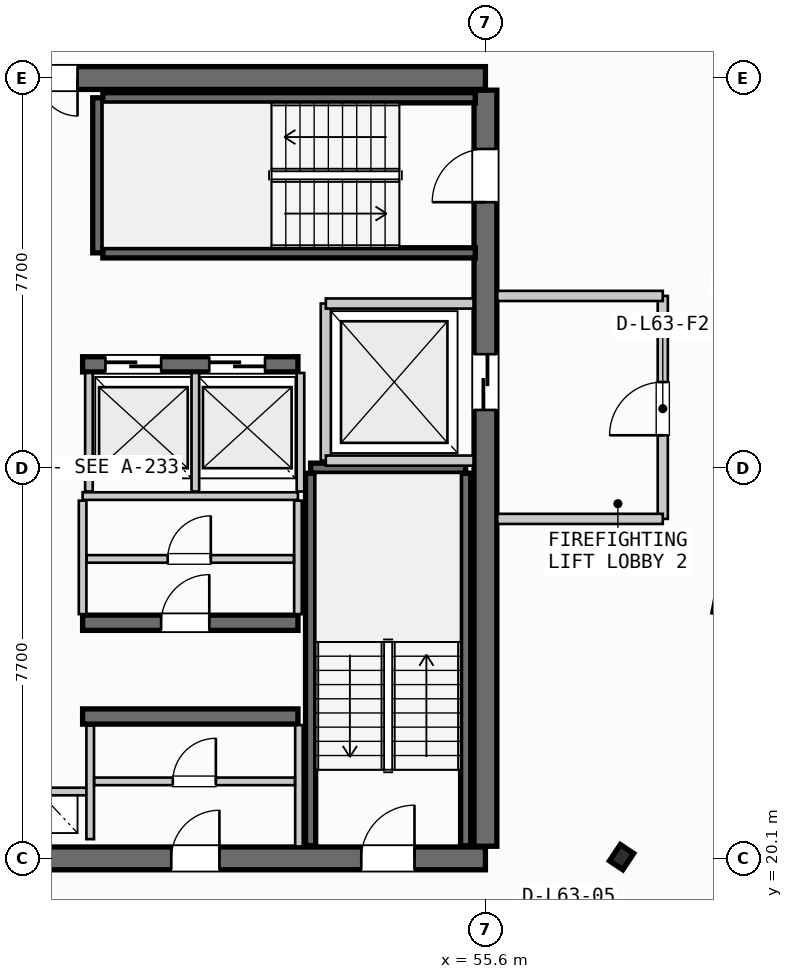
"""IFC4 building model, lengths in metres.
Left out: names, types, materials, properties, quantities, classifications, styles, units other than length and angle.
Written with IfcOpenShell. Run it as: python <this file> out.ifc"""

import sys

from ifc_helpers import new_model, si_unit, direction, frame, frame_2d, origin, origin_2d, place, context, subcontext, project, spatial, rectangle, i_section, extrude, source, transform, mapped, element, fill, save


model = new_model("IFC4")
c1 = context("Model", 3, precision=1e-05, world=origin(), true_north=direction((0.0, 1.0)))
c2 = subcontext(c1, "Body", "Model", "MODEL_VIEW")
j1 = project(units=[si_unit("LENGTHUNIT", "METRE"), si_unit("PLANEANGLEUNIT", "RADIAN")], contexts=[c1])
p1 = place(None, origin())
s1 = spatial("IfcSite", under=j1, at=p1, CompositionType="ELEMENT")
p2 = place(p1, origin())
s2 = spatial("IfcBuilding", under=s1, at=p2, CompositionType="ELEMENT")
p3 = place(p2, frame((0.0, 0.0, 242.2)))
s3 = spatial("IfcBuildingStorey", under=s2, at=p3, CompositionType="ELEMENT", Elevation=242.2)
p4 = place(p3, frame((38.0, 20.1, 0.0), z_axis=(0.0, 0.0, 1.0), x_axis=(1.0, 0.0, 0.0)))
e1 = element("IfcWall", 1, at=p4, inside=s3, PredefinedType="SHEAR", context=c2, shape_type="SweptSolid", body=[
    extrude(rectangle(XDim=17.6, YDim=0.45, at=frame_2d((8.8, 0.0))), origin(), (0.0, 0.0, 1.0), 3.21),
])
p5 = place(p4, frame((1.4, 0.0, 0.0)))
e2 = element("IfcOpeningElement", 2, at=p5, cuts=e1, PredefinedType="OPENING", context=c2, shape_type="SweptSolid", body=[
    extrude(rectangle(XDim=1.05, YDim=2.15, at=frame_2d((0.525, 1.075))), frame((0.0, 0.235, 0.0), z_axis=(0.0, -1.0, 0.0), x_axis=(1.0, 0.0, 0.0)), (0.0, 0.0, 1.0), 0.47),
])
p6 = place(p4, frame((15.15, 0.0, 0.0)))
e3 = element("IfcOpeningElement", 3, at=p6, cuts=e1, PredefinedType="OPENING", context=c2, shape_type="SweptSolid", body=[
    extrude(rectangle(XDim=1.05, YDim=2.15, at=frame_2d((0.525, 1.075))), frame((0.0, 0.235, 0.0), z_axis=(0.0, -1.0, 0.0), x_axis=(1.0, 0.0, 0.0)), (0.0, 0.0, 1.0), 0.47),
])
p7 = place(p4, frame((5.25, 0.0, 0.0)))
e4 = element("IfcOpeningElement", 4, at=p7, cuts=e1, PredefinedType="OPENING", context=c2, shape_type="SweptSolid", body=[
    extrude(rectangle(XDim=0.9, YDim=2.15, at=frame_2d((0.45, 1.075))), frame((0.0, 0.235, 0.0), z_axis=(0.0, -1.0, 0.0), x_axis=(1.0, 0.0, 0.0)), (0.0, 0.0, 1.0), 0.47),
])
p8 = place(p4, frame((11.4, 0.0, 0.0)))
e5 = element("IfcOpeningElement", 5, at=p8, cuts=e1, PredefinedType="OPENING", context=c2, shape_type="SweptSolid", body=[
    extrude(rectangle(XDim=0.95, YDim=2.15, at=frame_2d((0.475, 1.075))), frame((0.0, 0.235, 0.0), z_axis=(0.0, -1.0, 0.0), x_axis=(1.0, 0.0, 0.0)), (0.0, 0.0, 1.0), 0.47),
])
p9 = place(p3, frame((55.6, 35.5, 0.0), z_axis=(0.0, 0.0, 1.0), x_axis=(-1.0, 0.0, 0.0)))
e6 = element("IfcWall", 6, at=p9, inside=s3, PredefinedType="SHEAR", context=c2, shape_type="SweptSolid", body=[
    extrude(rectangle(XDim=17.6, YDim=0.45, at=frame_2d((8.8, 0.0))), origin(), (0.0, 0.0, 1.0), 3.21),
])
p10 = place(p9, frame((8.05, 0.0, 0.0)))
e7 = element("IfcOpeningElement", 7, at=p10, cuts=e6, PredefinedType="OPENING", context=c2, shape_type="SweptSolid", body=[
    extrude(rectangle(XDim=1.5, YDim=2.2, at=frame_2d((0.75, 1.1))), frame((0.0, 0.235, 0.0), z_axis=(0.0, -1.0, 0.0), x_axis=(1.0, 0.0, 0.0)), (0.0, 0.0, 1.0), 0.47),
])
p11 = place(p9, frame((15.1, 0.0, 0.0)))
e8 = element("IfcOpeningElement", 8, at=p11, cuts=e6, PredefinedType="OPENING", context=c2, shape_type="SweptSolid", body=[
    extrude(rectangle(XDim=0.95, YDim=2.15, at=frame_2d((0.475, 1.075))), frame((0.0, 0.235, 0.0), z_axis=(0.0, -1.0, 0.0), x_axis=(1.0, 0.0, 0.0)), (0.0, 0.0, 1.0), 0.47),
])
p12 = place(p9, frame((12.9, 0.0, 0.0)))
e9 = element("IfcOpeningElement", 9, at=p12, cuts=e6, PredefinedType="OPENING", context=c2, shape_type="SweptSolid", body=[
    extrude(rectangle(XDim=0.9, YDim=2.15, at=frame_2d((0.45, 1.075))), frame((0.0, 0.235, 0.0), z_axis=(0.0, -1.0, 0.0), x_axis=(1.0, 0.0, 0.0)), (0.0, 0.0, 1.0), 0.47),
])
p13 = place(p9, frame((10.6, 0.0, 0.0)))
e10 = element("IfcOpeningElement", 10, at=p13, cuts=e6, PredefinedType="OPENING", context=c2, shape_type="SweptSolid", body=[
    extrude(rectangle(XDim=0.95, YDim=2.15, at=frame_2d((0.475, 1.075))), frame((0.0, 0.235, 0.0), z_axis=(0.0, -1.0, 0.0), x_axis=(1.0, 0.0, 0.0)), (0.0, 0.0, 1.0), 0.47),
])
p14 = place(p3, frame((55.6, 20.34, 0.0), z_axis=(0.0, 0.0, 1.0), x_axis=(0.0, 1.0, 0.0)))
e11 = element("IfcWall", 11, at=p14, inside=s3, PredefinedType="SHEAR", context=c2, shape_type="SweptSolid", body=[
    extrude(rectangle(XDim=14.92, YDim=0.45, at=frame_2d((7.46, 0.0))), origin(), (0.0, 0.0, 1.0), 3.21),
])
p15 = place(p14, frame((12.71, 0.0, 0.0)))
e12 = element("IfcOpeningElement", 12, at=p15, cuts=e11, PredefinedType="OPENING", context=c2, shape_type="SweptSolid", body=[
    extrude(rectangle(XDim=1.05, YDim=2.15, at=frame_2d((0.525, 1.075))), frame((0.0, 0.235, 0.0), z_axis=(0.0, -1.0, 0.0), x_axis=(1.0, 0.0, 0.0)), (0.0, 0.0, 1.0), 0.47),
])
p16 = place(p14, frame((8.61, 0.0, 0.0)))
e13 = element("IfcOpeningElement", 13, at=p16, cuts=e11, PredefinedType="OPENING", context=c2, shape_type="SweptSolid", body=[
    extrude(rectangle(XDim=1.1, YDim=2.2, at=frame_2d((0.55, 1.1))), frame((0.0, 0.235, 0.0), z_axis=(0.0, -1.0, 0.0), x_axis=(1.0, 0.0, 0.0)), (0.0, 0.0, 1.0), 0.47),
])
p17 = place(p3, frame((47.65, 22.9, 0.0), z_axis=(0.0, 0.0, 1.0), x_axis=(1.0, 0.0, 0.0)))
e14 = element("IfcWall", 14, at=p17, inside=s3, PredefinedType="SHEAR", context=c2, shape_type="SweptSolid", body=[
    extrude(rectangle(XDim=4.25, YDim=0.3, at=frame_2d((2.125, 0.0))), origin(), (0.0, 0.0, 1.0), 3.21),
])
p18 = place(p3, frame((47.65, 24.75, 0.0), z_axis=(0.0, 0.0, 1.0), x_axis=(1.0, 0.0, 0.0)))
e15 = element("IfcWall", 15, at=p18, inside=s3, PredefinedType="SHEAR", context=c2, shape_type="SweptSolid", body=[
    extrude(rectangle(XDim=4.25, YDim=0.3, at=frame_2d((2.125, 0.0))), origin(), (0.0, 0.0, 1.0), 3.21),
])
p19 = place(p18, frame((1.55, 0.0, 0.0)))
e16 = element("IfcOpeningElement", 16, at=p19, cuts=e15, PredefinedType="OPENING", context=c2, shape_type="SweptSolid", body=[
    extrude(rectangle(XDim=0.95, YDim=2.15, at=frame_2d((0.475, 1.075))), frame((0.0, 0.16, 0.0), z_axis=(0.0, -1.0, 0.0), x_axis=(1.0, 0.0, 0.0)), (0.0, 0.0, 1.0), 0.32),
])
p20 = place(p3, frame((47.65, 29.85, 0.0), z_axis=(0.0, 0.0, 1.0), x_axis=(1.0, 0.0, 0.0)))
e17 = element("IfcWall", 17, at=p20, inside=s3, PredefinedType="SHEAR", context=c2, shape_type="SweptSolid", body=[
    extrude(rectangle(XDim=4.25, YDim=0.3, at=frame_2d((2.125, 0.0))), origin(), (0.0, 0.0, 1.0), 3.21),
])
p21 = place(p20, frame((0.45, 0.0, 0.0)))
e18 = element("IfcOpeningElement", 18, at=p21, cuts=e17, PredefinedType="OPENING", context=c2, shape_type="SweptSolid", body=[
    extrude(rectangle(XDim=1.1, YDim=2.2, at=frame_2d((0.55, 1.1))), frame((0.0, 0.16, 0.0), z_axis=(0.0, -1.0, 0.0), x_axis=(1.0, 0.0, 0.0)), (0.0, 0.0, 1.0), 0.32),
])
p22 = place(p20, frame((2.5, 0.0, 0.0)))
e19 = element("IfcOpeningElement", 19, at=p22, cuts=e17, PredefinedType="OPENING", context=c2, shape_type="SweptSolid", body=[
    extrude(rectangle(XDim=1.1, YDim=2.2, at=frame_2d((0.55, 1.1))), frame((0.0, 0.16, 0.0), z_axis=(0.0, -1.0, 0.0), x_axis=(1.0, 0.0, 0.0)), (0.0, 0.0, 1.0), 0.32),
])
m1 = source(origin(), c2, "Body", "SweptSolid", [
    extrude(i_section(OverallWidth=0.387, OverallDepth=0.316, WebThickness=0.019, FlangeThickness=0.028, FilletRadius=0.015, at=origin_2d()), origin(), (0.0, 0.0, 1.0), 3.21),
])
for number, where, z_axis, x_axis in (
    (20, (58.287, 20.125, 0.0), (0.0, 0.0, 1.0), (0.831, -0.556, 0.0)),
    (21, (60.284, 25.118, 0.0), (0.0, 0.0, 1.0), (0.981, -0.195, 0.0)),
):
    element("IfcColumn", number, at=place(p3, frame(where, z_axis=z_axis, x_axis=x_axis)), inside=s3, PredefinedType="COLUMN", context=c2, shape_type="MappedRepresentation", body=[
        mapped(m1, transform((0.0, 0.0, 0.0), scale=1.0)),
    ])
p23 = place(p3, frame((52.15, 27.8, 0.0), z_axis=(0.0, 0.0, 1.0), x_axis=(1.0, 0.0, 0.0)))
e22 = element("IfcWall", 22, at=p23, inside=s3, PredefinedType="SHEAR", context=c2, shape_type="SweptSolid", body=[
    extrude(rectangle(XDim=3.06, YDim=0.2, at=frame_2d((1.53, 0.0))), origin(), (0.0, 0.0, 1.0), 3.21),
])
for number, where, z_axis, x_axis in (
    (23, (55.21, 27.7, 0.0), (0.0, 0.0, 1.0), (0.0, -1.0, 0.0)),
    (24, (52.15, 20.35, 0.0), (0.0, 0.0, 1.0), (0.0, 1.0, 0.0)),
):
    element("IfcWall", number, at=place(p3, frame(where, z_axis=z_axis, x_axis=x_axis)), inside=s3, PredefinedType="SHEAR", context=c2, shape_type="SweptSolid", body=[
        extrude(rectangle(XDim=7.35, YDim=0.2, at=frame_2d((3.675, 0.0))), origin(), (0.0, 0.0, 1.0), 3.21),
    ])
p24 = place(p3, frame((47.95, 32.05, 0.0), z_axis=(0.0, 0.0, 1.0), x_axis=(0.0, 1.0, 0.0)))
e25 = element("IfcWall", 25, at=p24, inside=s3, PredefinedType="SHEAR", context=c2, shape_type="SweptSolid", body=[
    extrude(rectangle(XDim=3.06, YDim=0.2, at=frame_2d((1.53, 0.0))), origin(), (0.0, 0.0, 1.0), 3.21),
])
for number, where, z_axis, x_axis in (
    (26, (48.05, 35.11, 0.0), (0.0, 0.0, 1.0), (1.0, 0.0, 0.0)),
    (27, (55.4, 32.05, 0.0), (0.0, 0.0, 1.0), (-1.0, 0.0, 0.0)),
):
    element("IfcWall", number, at=place(p3, frame(where, z_axis=z_axis, x_axis=x_axis)), inside=s3, PredefinedType="SHEAR", context=c2, shape_type="SweptSolid", body=[
        extrude(rectangle(XDim=7.35, YDim=0.2, at=frame_2d((3.675, 0.0))), origin(), (0.0, 0.0, 1.0), 3.21),
    ])
p25 = place(p3, frame((45.8, 21.42, 0.0), z_axis=(0.0, 0.0, 1.0), x_axis=(1.0, 0.0, 0.0)))
e28 = element("IfcWall", 28, at=p25, inside=s3, PredefinedType="PARTITIONING", context=c2, shape_type="SweptSolid", body=[
    extrude(rectangle(XDim=2.0, YDim=0.15, at=frame_2d((1.0, 0.0))), origin(), (0.0, 0.0, 1.0), 2.28),
])
p26 = place(p3, frame((47.8, 20.48, 0.0), z_axis=(0.0, 0.0, 1.0), x_axis=(0.0, 1.0, 0.0)))
e29 = element("IfcWall", 29, at=p26, inside=s3, PredefinedType="PARTITIONING", context=c2, shape_type="SweptSolid", body=[
    extrude(rectangle(XDim=2.24, YDim=0.15, at=frame_2d((1.12, 0.0))), origin(), (0.0, 0.0, 1.0), 2.28),
])
p27 = place(p3, frame((52.45, 27.95, 0.0), z_axis=(0.0, 0.0, 1.0), x_axis=(0.0, 1.0, 0.0)))
e30 = element("IfcWall", 30, at=p27, inside=s3, PredefinedType="PARTITIONING", context=c2, shape_type="SweptSolid", body=[
    extrude(rectangle(XDim=3.1, YDim=0.2, at=frame_2d((1.55, 0.0))), origin(), (0.0, 0.0, 1.0), 2.28),
])
for number, where, z_axis, x_axis in (
    (31, (52.45, 27.95, 0.0), (0.0, 0.0, 1.0), (1.0, 0.0, 0.0)),
    (32, (52.45, 31.05, 0.0), (0.0, 0.0, 1.0), (1.0, 0.0, 0.0)),
):
    element("IfcWall", number, at=place(p3, frame(where, z_axis=z_axis, x_axis=x_axis)), inside=s3, PredefinedType="PARTITIONING", context=c2, shape_type="SweptSolid", body=[
        extrude(rectangle(XDim=2.915, YDim=0.2, at=frame_2d((1.458, 0.0))), origin(), (0.0, 0.0, 1.0), 2.28),
    ])
p28 = place(p3, frame((59.1, 26.8, 0.0), z_axis=(0.0, 0.0, 1.0), x_axis=(0.0, 1.0, 0.0)))
e33 = element("IfcWall", 33, at=p28, inside=s3, PredefinedType="PARTITIONING", context=c2, shape_type="SweptSolid", body=[
    extrude(rectangle(XDim=4.4, YDim=0.2, at=frame_2d((2.2, 0.0))), origin(), (0.0, 0.0, 1.0), 2.28),
])
p29 = place(p28, frame((1.65, 0.0, 0.0)))
e34 = element("IfcOpeningElement", 34, at=p29, cuts=e33, PredefinedType="OPENING", context=c2, shape_type="SweptSolid", body=[
    extrude(rectangle(XDim=1.05, YDim=2.15, at=frame_2d((0.525, 1.075))), frame((0.0, 0.11, 0.0), z_axis=(0.0, -1.0, 0.0), x_axis=(1.0, 0.0, 0.0)), (0.0, 0.0, 1.0), 0.22),
])
for number, where, z_axis, x_axis in (
    (35, (55.835, 26.8, 0.0), (0.0, 0.0, 1.0), (1.0, 0.0, 0.0)),
    (36, (55.835, 31.2, 0.0), (0.0, 0.0, 1.0), (1.0, 0.0, 0.0)),
):
    element("IfcWall", number, at=place(p3, frame(where, z_axis=z_axis, x_axis=x_axis)), inside=s3, PredefinedType="PARTITIONING", context=c2, shape_type="SweptSolid", body=[
        extrude(rectangle(XDim=3.265, YDim=0.2, at=frame_2d((1.633, 0.0))), origin(), (0.0, 0.0, 1.0), 2.28),
    ])
p30 = place(p3, frame((51.92, 20.335, 0.0), z_axis=(0.0, 0.0, 1.0), x_axis=(0.0, 1.0, 0.0)))
e37 = element("IfcWall", 37, at=p30, inside=s3, PredefinedType="PARTITIONING", context=c2, shape_type="SweptSolid", body=[
    extrude(rectangle(XDim=2.395, YDim=0.15, at=frame_2d((1.198, 0.0))), origin(), (0.0, 0.0, 1.0), 2.28),
])
p31 = place(p3, frame((47.88, 21.62, 0.0), z_axis=(0.0, 0.0, 1.0), x_axis=(1.0, 0.0, 0.0)))
e38 = element("IfcWall", 38, at=p31, inside=s3, PredefinedType="PARTITIONING", context=c2, shape_type="SweptSolid", body=[
    extrude(rectangle(XDim=3.96, YDim=0.15, at=frame_2d((1.98, 0.0))), origin(), (0.0, 0.0, 1.0), 2.28),
])
p32 = place(p31, frame((1.55, 0.0, 0.0)))
e39 = element("IfcOpeningElement", 39, at=p32, cuts=e38, PredefinedType="OPENING", context=c2, shape_type="SweptSolid", body=[
    extrude(rectangle(XDim=0.85, YDim=2.15, at=frame_2d((0.425, 1.075))), frame((0.0, 0.085, 0.0), z_axis=(0.0, -1.0, 0.0), x_axis=(1.0, 0.0, 0.0)), (0.0, 0.0, 1.0), 0.17),
])
p33 = place(p3, frame((47.65, 27.25, 0.0), z_axis=(0.0, 0.0, 1.0), x_axis=(1.0, 0.0, 0.0)))
e40 = element("IfcWall", 40, at=p33, inside=s3, PredefinedType="PARTITIONING", context=c2, shape_type="SweptSolid", body=[
    extrude(rectangle(XDim=4.25, YDim=0.15, at=frame_2d((2.125, 0.0))), origin(), (0.0, 0.0, 1.0), 2.28),
])
for number, where, z_axis, x_axis in (
    (41, (47.65, 24.92, 0.0), (0.0, 0.0, 1.0), (0.0, 1.0, 0.0)),
    (42, (51.9, 24.92, 0.0), (0.0, 0.0, 1.0), (0.0, 1.0, 0.0)),
):
    element("IfcWall", number, at=place(p3, frame(where, z_axis=z_axis, x_axis=x_axis)), inside=s3, PredefinedType="PARTITIONING", context=c2, shape_type="SweptSolid", body=[
        extrude(rectangle(XDim=2.24, YDim=0.15, at=frame_2d((1.12, 0.0))), origin(), (0.0, 0.0, 1.0), 2.28),
    ])
p34 = place(p3, frame((47.73, 26.01, 0.0), z_axis=(0.0, 0.0, 1.0), x_axis=(1.0, 0.0, 0.0)))
e43 = element("IfcWall", 43, at=p34, inside=s3, PredefinedType="PARTITIONING", context=c2, shape_type="SweptSolid", body=[
    extrude(rectangle(XDim=4.09, YDim=0.15, at=frame_2d((2.045, 0.0))), origin(), (0.0, 0.0, 1.0), 2.28),
])
p35 = place(p34, frame((1.6, 0.0, 0.0)))
e44 = element("IfcOpeningElement", 44, at=p35, cuts=e43, PredefinedType="OPENING", context=c2, shape_type="SweptSolid", body=[
    extrude(rectangle(XDim=0.85, YDim=2.15, at=frame_2d((0.425, 1.075))), frame((0.0, 0.085, 0.0), z_axis=(0.0, -1.0, 0.0), x_axis=(1.0, 0.0, 0.0)), (0.0, 0.0, 1.0), 0.17),
])
for number, where, z_axis, x_axis in (
    (45, (47.775, 27.34, 0.0), (0.0, 0.0, 1.0), (0.0, 1.0, 0.0)),
    (46, (49.875, 27.34, 0.0), (0.0, 0.0, 1.0), (0.0, 1.0, 0.0)),
    (47, (51.95, 27.34, 0.0), (0.0, 0.0, 1.0), (0.0, 1.0, 0.0)),
):
    element("IfcWall", number, at=place(p3, frame(where, z_axis=z_axis, x_axis=x_axis)), inside=s3, PredefinedType="PARTITIONING", context=c2, shape_type="SweptSolid", body=[
        extrude(rectangle(XDim=2.34, YDim=0.15, at=frame_2d((1.17, 0.0))), origin(), (0.0, 0.0, 1.0), 2.28),
    ])
m2 = source(origin(), c2, "Body", "SweptSolid", [
    extrude(rectangle(XDim=1.05, YDim=2.15, at=frame_2d((0.525, 1.075))), frame((0.0, 0.025, 0.0), z_axis=(0.0, -1.0, 0.0), x_axis=(1.0, 0.0, 0.0)), (0.0, 0.0, 1.0), 0.05),
])
p36 = place(p6, origin())
e48 = element("IfcDoor", 48, at=p36, inside=s3, OperationType="SINGLE_SWING_RIGHT", PredefinedType="DOOR", context=c2, shape_type="MappedRepresentation", body=[
    mapped(m2, transform((0.0, 0.0, 0.0), scale=1.0)),
])
fill(e3, e48)
p37 = place(p15, origin())
e49 = element("IfcDoor", 49, at=p37, inside=s3, OperationType="SINGLE_SWING_LEFT", PredefinedType="DOOR", context=c2, shape_type="MappedRepresentation", body=[
    mapped(m2, transform((0.0, 0.0, 0.0), scale=1.0)),
])
fill(e12, e49)
m3 = source(origin(), c2, "Body", "SweptSolid", [
    extrude(rectangle(XDim=1.5, YDim=2.2, at=frame_2d((0.75, 1.1))), frame((0.0, 0.025, 0.0), z_axis=(0.0, -1.0, 0.0), x_axis=(1.0, 0.0, 0.0)), (0.0, 0.0, 1.0), 0.05),
])
p38 = place(p10, origin())
e50 = element("IfcDoor", 50, at=p38, inside=s3, OperationType="DOUBLE_DOOR_SINGLE_SWING", PredefinedType="DOOR", context=c2, shape_type="MappedRepresentation", body=[
    mapped(m3, transform((0.0, 0.0, 0.0), scale=1.0)),
])
fill(e7, e50)
m4 = source(origin(), c2, "Body", "SweptSolid", [
    extrude(rectangle(XDim=1.1, YDim=2.2, at=frame_2d((0.55, 1.1))), frame((0.0, 0.025, 0.0), z_axis=(0.0, -1.0, 0.0), x_axis=(1.0, 0.0, 0.0)), (0.0, 0.0, 1.0), 0.05),
])
p39 = place(p16, origin())
e51 = element("IfcDoor", 51, at=p39, inside=s3, OperationType="SLIDING_TO_RIGHT", PredefinedType="DOOR", context=c2, shape_type="MappedRepresentation", body=[
    mapped(m4, transform((0.0, 0.0, 0.0), scale=1.0)),
])
fill(e13, e51)
m5 = source(origin(), c2, "Body", "SweptSolid", [
    extrude(rectangle(XDim=0.95, YDim=2.15, at=frame_2d((0.475, 1.075))), frame((0.0, 0.025, 0.0), z_axis=(0.0, -1.0, 0.0), x_axis=(1.0, 0.0, 0.0)), (0.0, 0.0, 1.0), 0.05),
])
p40 = place(p8, origin())
e52 = element("IfcDoor", 52, at=p40, inside=s3, OperationType="SINGLE_SWING_RIGHT", PredefinedType="DOOR", context=c2, shape_type="MappedRepresentation", body=[
    mapped(m5, transform((0.0, 0.0, 0.0), scale=1.0)),
])
fill(e5, e52)
p41 = place(p19, origin())
e53 = element("IfcDoor", 53, at=p41, inside=s3, OperationType="SINGLE_SWING_RIGHT", PredefinedType="DOOR", context=c2, shape_type="MappedRepresentation", body=[
    mapped(m5, transform((0.0, 0.0, 0.0), scale=1.0)),
])
fill(e16, e53)
p42 = place(p21, origin())
e54 = element("IfcDoor", 54, at=p42, inside=s3, OperationType="SLIDING_TO_LEFT", PredefinedType="DOOR", context=c2, shape_type="MappedRepresentation", body=[
    mapped(m4, transform((0.0, 0.0, 0.0), scale=1.0)),
])
fill(e18, e54)
p43 = place(p22, origin())
e55 = element("IfcDoor", 55, at=p43, inside=s3, OperationType="SLIDING_TO_LEFT", PredefinedType="DOOR", context=c2, shape_type="MappedRepresentation", body=[
    mapped(m4, transform((0.0, 0.0, 0.0), scale=1.0)),
])
fill(e19, e55)
p44 = place(p29, origin())
e56 = element("IfcDoor", 56, at=p44, inside=s3, OperationType="SINGLE_SWING_LEFT", PredefinedType="DOOR", context=c2, shape_type="MappedRepresentation", body=[
    mapped(m2, transform((0.0, 0.0, 0.0), scale=1.0)),
])
fill(e34, e56)
m6 = source(origin(), c2, "Body", "SweptSolid", [
    extrude(rectangle(XDim=0.85, YDim=2.15, at=frame_2d((0.425, 1.075))), frame((0.0, 0.025, 0.0), z_axis=(0.0, -1.0, 0.0), x_axis=(1.0, 0.0, 0.0)), (0.0, 0.0, 1.0), 0.05),
])
p45 = place(p32, origin())
e57 = element("IfcDoor", 57, at=p45, inside=s3, OperationType="SINGLE_SWING_RIGHT", PredefinedType="DOOR", context=c2, shape_type="MappedRepresentation", body=[
    mapped(m6, transform((0.0, 0.0, 0.0), scale=1.0)),
])
fill(e39, e57)
p46 = place(p35, origin())
e58 = element("IfcDoor", 58, at=p46, inside=s3, OperationType="SINGLE_SWING_RIGHT", PredefinedType="DOOR", context=c2, shape_type="MappedRepresentation", body=[
    mapped(m6, transform((0.0, 0.0, 0.0), scale=1.0)),
])
fill(e44, e58)
save(model, sys.argv[1])
